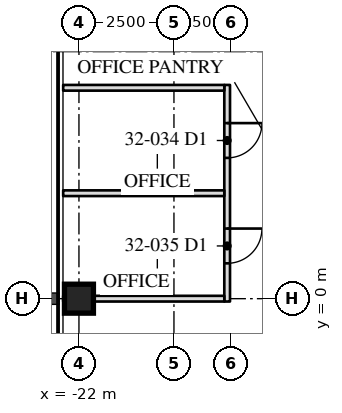
"""IFC4 building model, lengths in metres.
Left out: names, types, materials, properties, quantities, classifications, styles, units other than length and angle.
Written with IfcOpenShell. Run it as: python <this file> out.ifc"""

import sys

from ifc_helpers import new_model, si_unit, direction, frame, frame_2d, origin, origin_2d, place, context, subcontext, project, spatial, rectangle, hollow_rectangle, extrude, element, fill, save


model = new_model("IFC4")
c1 = context("Model", 3, precision=1e-05, world=origin(), true_north=direction((0.0, 1.0)))
c2 = subcontext(c1, "Body", "Model", "MODEL_VIEW")
j1 = project(units=[si_unit("LENGTHUNIT", "METRE"), si_unit("PLANEANGLEUNIT", "RADIAN")], contexts=[c1])
p1 = place(None, origin())
s1 = spatial("IfcSite", under=j1, at=p1, CompositionType="ELEMENT")
p2 = place(p1, origin())
s2 = spatial("IfcBuilding", under=s1, at=p2, CompositionType="ELEMENT")
p3 = place(p2, frame((0.0, 0.0, 137.7)))
s3 = spatial("IfcBuildingStorey", under=s2, at=p3, CompositionType="ELEMENT", Elevation=137.7)
p4 = place(p3, frame((-22.0, 0.0, 0.0), z_axis=(0.0, 0.0, 1.0), x_axis=(0.0, 1.0, 0.0)))
e1 = element("IfcColumn", 1, at=p4, inside=s3, PredefinedType="COLUMN", context=c2, shape_type="SweptSolid", body=[
    extrude(hollow_rectangle(XDim=0.762, YDim=0.762, WallThickness=0.076, at=origin_2d()), origin(), (0.0, 0.0, 1.0), 4.1),
])
p5 = place(p3, frame((-18.1, 5.624, 0.0), z_axis=(0.0, 0.0, 1.0), x_axis=(0.0, -1.0, 0.0)))
e2 = element("IfcWall", 2, at=p5, inside=s3, PredefinedType="PARTITIONING", context=c2, shape_type="SweptSolid", body=[
    extrude(rectangle(XDim=5.699, YDim=0.15, at=frame_2d((2.85, 0.0))), origin(), (0.0, 0.0, 1.0), 3.91),
])
p6 = place(p5, frame((1.004, 0.0, 0.0)))
e3 = element("IfcOpeningElement", 3, at=p6, cuts=e2, PredefinedType="OPENING", context=c2, shape_type="SweptSolid", body=[
    extrude(rectangle(XDim=0.915, YDim=2.134, at=frame_2d((0.458, 1.067))), frame((0.0, 0.085, 0.0), z_axis=(0.0, -1.0, 0.0), x_axis=(1.0, 0.0, 0.0)), (0.0, 0.0, 1.0), 0.17),
])
p7 = place(p5, frame((3.779, 0.0, 0.0)))
e4 = element("IfcOpeningElement", 4, at=p7, cuts=e2, PredefinedType="OPENING", context=c2, shape_type="SweptSolid", body=[
    extrude(rectangle(XDim=0.915, YDim=2.134, at=frame_2d((0.458, 1.067))), frame((0.0, 0.085, 0.0), z_axis=(0.0, -1.0, 0.0), x_axis=(1.0, 0.0, 0.0)), (0.0, 0.0, 1.0), 0.17),
])
for number, where, z_axis, x_axis in (
    (5, (-18.175, 5.549, 0.0), (0.0, 0.0, 1.0), (-1.0, 0.0, 0.0)),
    (6, (-18.175, 2.775, 0.0), (0.0, 0.0, 1.0), (-1.0, 0.0, 0.0)),
):
    element("IfcWall", number, at=place(p3, frame(where, z_axis=z_axis, x_axis=x_axis)), inside=s3, PredefinedType="PARTITIONING", context=c2, shape_type="SweptSolid", body=[
        extrude(rectangle(XDim=4.24, YDim=0.15, at=frame_2d((2.12, 0.0))), origin(), (0.0, 0.0, 1.0), 3.91),
    ])
p8 = place(p3, frame((-18.175, 0.0, 0.0), z_axis=(0.0, 0.0, 1.0), x_axis=(-1.0, 0.0, 0.0)))
e7 = element("IfcWall", 7, at=p8, inside=s3, PredefinedType="PARTITIONING", context=c2, shape_type="SweptSolid", body=[
    extrude(rectangle(XDim=4.24, YDim=0.15, at=frame_2d((2.12, 0.0))), origin(), (0.0, 0.0, 1.0), 3.326),
])
p9 = place(p6, origin())
e8 = element("IfcDoor", 8, at=p9, inside=s3, OperationType="SINGLE_SWING_LEFT", PredefinedType="DOOR", context=c2, shape_type="SweptSolid", body=[
    extrude(rectangle(XDim=0.915, YDim=2.134, at=frame_2d((0.458, 1.067))), frame((0.0, 0.025, 0.0), z_axis=(0.0, -1.0, 0.0), x_axis=(1.0, 0.0, 0.0)), (0.0, 0.0, 1.0), 0.05),
])
fill(e3, e8)
p10 = place(p7, origin())
e9 = element("IfcDoor", 9, at=p10, inside=s3, OperationType="SINGLE_SWING_LEFT", PredefinedType="DOOR", context=c2, shape_type="SweptSolid", body=[
    extrude(rectangle(XDim=0.915, YDim=2.134, at=frame_2d((0.458, 1.067))), frame((0.0, 0.025, 0.0), z_axis=(0.0, -1.0, 0.0), x_axis=(1.0, 0.0, 0.0)), (0.0, 0.0, 1.0), 0.05),
])
fill(e4, e9)
save(model, sys.argv[1])
